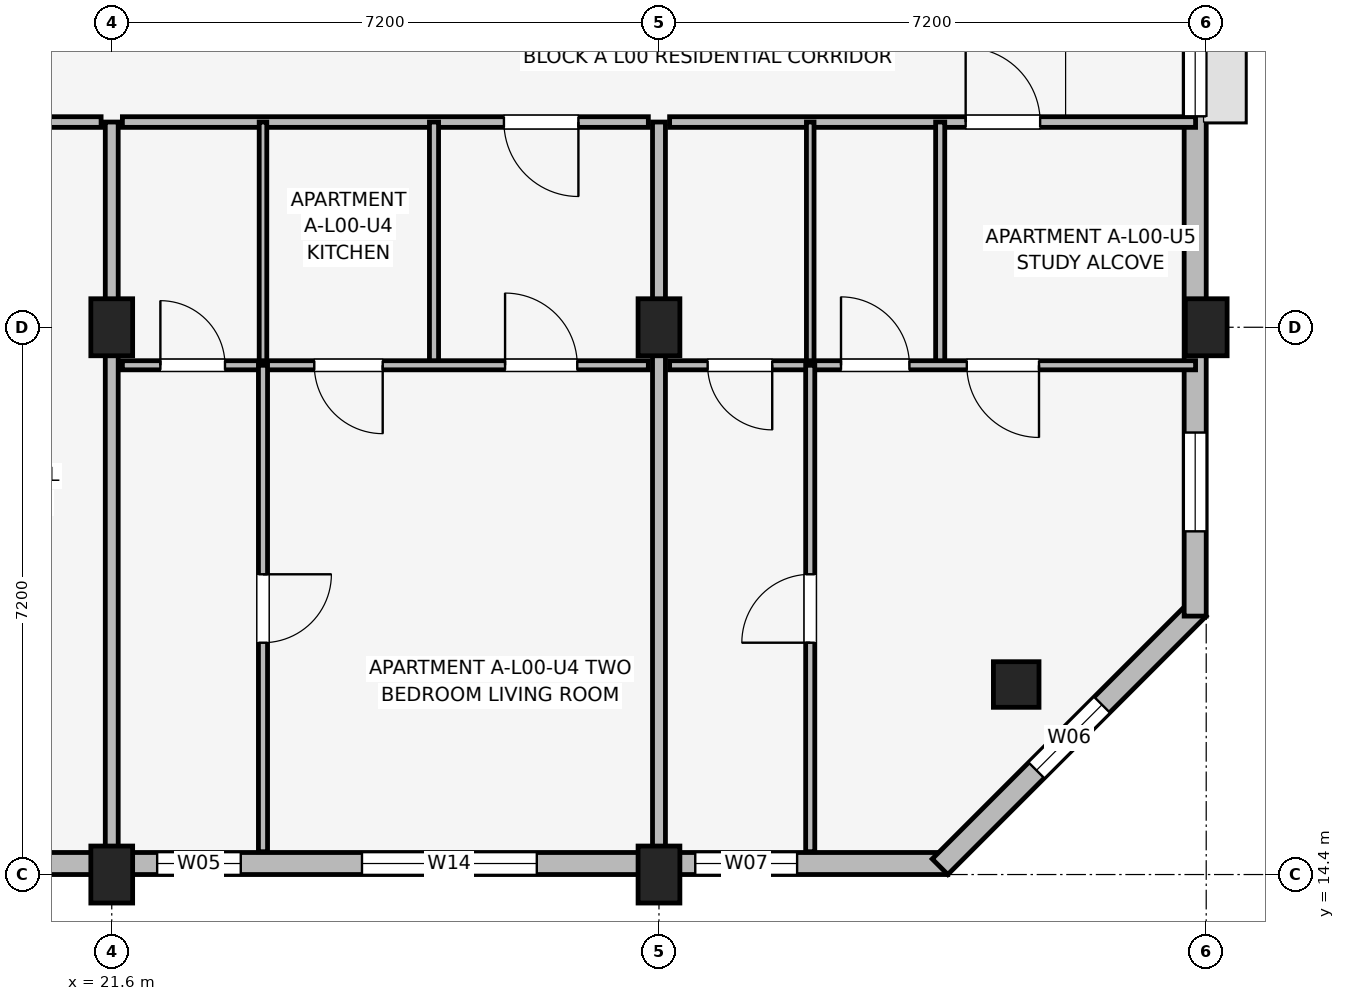
"""IFC4 building model, lengths in metres.
Left out: names, types, materials, properties, quantities, classifications, styles, units other than length and angle.
Written with IfcOpenShell. Run it as: python <this file> out.ifc"""

import sys

from ifc_helpers import new_model, si_unit, direction, frame, frame_2d, origin, origin_2d, place, context, subcontext, project, spatial, rectangle, extrude, element, fill, save


model = new_model("IFC4")
c1 = context("Model", 3, precision=1e-05, world=origin(), true_north=direction((0.0, 1.0)))
c2 = subcontext(c1, "Body", "Model", "MODEL_VIEW")
j1 = project(units=[si_unit("LENGTHUNIT", "METRE"), si_unit("PLANEANGLEUNIT", "RADIAN")], contexts=[c1])
p1 = place(None, origin())
s1 = spatial("IfcSite", under=j1, at=p1, CompositionType="ELEMENT")
p2 = place(p1, origin())
s2 = spatial("IfcBuilding", under=s1, at=p2, CompositionType="ELEMENT")
p3 = place(p2, origin())
s3 = spatial("IfcBuildingStorey", under=s2, at=p3, CompositionType="ELEMENT", Elevation=0.0)
for number, where, z_axis, x_axis in (
    (1, (21.6, 14.4, 0.0), (0.0, 0.0, 1.0), (1.0, 0.0, 0.0)),
    (2, (21.6, 21.6, 0.0), (0.0, 0.0, 1.0), (1.0, 0.0, 0.0)),
    (3, (28.8, 14.4, 0.0), (0.0, 0.0, 1.0), (1.0, 0.0, 0.0)),
    (4, (28.8, 21.6, 0.0), (0.0, 0.0, 1.0), (1.0, 0.0, 0.0)),
):
    element("IfcColumn", number, at=place(p3, frame(where, z_axis=z_axis, x_axis=x_axis)), inside=s3, PredefinedType="COLUMN", context=c2, shape_type="SweptSolid", body=[
        extrude(rectangle(XDim=0.55, YDim=0.75, at=origin_2d()), origin(), (0.0, 0.0, 1.0), 4.5),
    ])
p4 = place(p3, frame((33.5, 16.9, 0.0), z_axis=(0.0, 0.0, 1.0), x_axis=(1.0, 0.0, 0.0)))
e5 = element("IfcColumn", 5, at=p4, inside=s3, PredefinedType="COLUMN", context=c2, shape_type="SweptSolid", body=[
    extrude(rectangle(XDim=0.6, YDim=0.6, at=origin_2d()), origin(), (0.0, 0.0, 1.0), 4.5),
])
p5 = place(p3, frame((36.0, 21.6, 0.0), z_axis=(0.0, 0.0, 1.0), x_axis=(1.0, 0.0, 0.0)))
e6 = element("IfcColumn", 6, at=p5, inside=s3, PredefinedType="COLUMN", context=c2, shape_type="SweptSolid", body=[
    extrude(rectangle(XDim=0.55, YDim=0.75, at=origin_2d()), origin(), (0.0, 0.0, 1.0), 4.5),
])
p6 = place(p3, frame((3.4, 14.545, 0.0), z_axis=(0.0, 0.0, 1.0), x_axis=(1.0, 0.0, 0.0)))
e7 = element("IfcWall", 7, at=p6, inside=s3, PredefinedType="SOLIDWALL", context=c2, shape_type="SweptSolid", body=[
    extrude(rectangle(XDim=29.2, YDim=0.29, at=frame_2d((14.6, 0.0))), origin(), (0.0, 0.0, 1.0), 3.53),
])
p7 = place(p6, frame((13.95, 0.0, 0.0), z_axis=(0.0, 0.0, 1.0), x_axis=(-1.0, 0.0, 0.0)))
e8 = element("IfcOpeningElement", 8, at=p7, cuts=e7, PredefinedType="OPENING", context=c2, shape_type="SweptSolid", body=[
    extrude(rectangle(XDim=1.8, YDim=2.4, at=frame_2d((0.9, 1.2))), frame((0.0, 0.155, 0.0), z_axis=(0.0, -1.0, 0.0), x_axis=(1.0, 0.0, 0.0)), (0.0, 0.0, 1.0), 0.31),
])
p8 = place(p6, frame((1.502, 0.0, 0.75)))
e9 = element("IfcOpeningElement", 9, at=p8, cuts=e7, PredefinedType="OPENING", context=c2, shape_type="SweptSolid", body=[
    extrude(rectangle(XDim=0.85, YDim=1.4, at=frame_2d((0.425, 0.7))), frame((0.0, 0.155, 0.0), z_axis=(0.0, -1.0, 0.0), x_axis=(1.0, 0.0, 0.0)), (0.0, 0.0, 1.0), 0.31),
])
p9 = place(p6, frame((6.4, 0.0, 0.7)))
e10 = element("IfcOpeningElement", 10, at=p9, cuts=e7, PredefinedType="OPENING", context=c2, shape_type="SweptSolid", body=[
    extrude(rectangle(XDim=2.0, YDim=1.65, at=frame_2d((1.0, 0.825))), frame((0.0, 0.155, 0.0), z_axis=(0.0, -1.0, 0.0), x_axis=(1.0, 0.0, 0.0)), (0.0, 0.0, 1.0), 0.31),
])
p10 = place(p6, frame((18.798, 0.0, 0.75)))
e11 = element("IfcOpeningElement", 11, at=p10, cuts=e7, PredefinedType="OPENING", context=c2, shape_type="SweptSolid", body=[
    extrude(rectangle(XDim=1.1, YDim=1.5, at=frame_2d((0.55, 0.75))), frame((0.0, 0.155, 0.0), z_axis=(0.0, -1.0, 0.0), x_axis=(1.0, 0.0, 0.0)), (0.0, 0.0, 1.0), 0.31),
])
p11 = place(p6, frame((21.492, 0.0, 0.7)))
e12 = element("IfcOpeningElement", 12, at=p11, cuts=e7, PredefinedType="OPENING", context=c2, shape_type="SweptSolid", body=[
    extrude(rectangle(XDim=2.3, YDim=1.65, at=frame_2d((1.15, 0.825))), frame((0.0, 0.155, 0.0), z_axis=(0.0, -1.0, 0.0), x_axis=(1.0, 0.0, 0.0)), (0.0, 0.0, 1.0), 0.31),
])
p12 = place(p6, frame((25.877, 0.0, 0.75)))
e13 = element("IfcOpeningElement", 13, at=p12, cuts=e7, PredefinedType="OPENING", context=c2, shape_type="SweptSolid", body=[
    extrude(rectangle(XDim=1.34, YDim=1.55, at=frame_2d((0.67, 0.775))), frame((0.0, 0.155, 0.0), z_axis=(0.0, -1.0, 0.0), x_axis=(1.0, 0.0, 0.0)), (0.0, 0.0, 1.0), 0.31),
])
p13 = place(p3, frame((32.498, 14.502, 0.0), z_axis=(0.0, 0.0, 1.0), x_axis=(0.707081393635, 0.707132167827, 0.0)))
e14 = element("IfcWall", 14, at=p13, inside=s3, PredefinedType="SOLIDWALL", context=c2, shape_type="SweptSolid", body=[
    extrude(rectangle(XDim=4.808, YDim=0.29, at=frame_2d((2.404, 0.0))), origin(), (0.0, 0.0, 1.0), 4.175),
])
p14 = place(p13, frame((1.794, 0.0, 0.85)))
e15 = element("IfcOpeningElement", 15, at=p14, cuts=e14, PredefinedType="OPENING", context=c2, shape_type="SweptSolid", body=[
    extrude(rectangle(XDim=1.22, YDim=1.5, at=frame_2d((0.61, 0.75))), frame((0.0, 0.155, 0.0), z_axis=(0.0, -1.0, 0.0), x_axis=(1.0, 0.0, 0.0)), (0.0, 0.0, 1.0), 0.31),
])
p15 = place(p3, frame((35.855, 17.8, 0.0), z_axis=(0.0, 0.0, 1.0), x_axis=(0.0, 1.0, 0.0)))
e16 = element("IfcWall", 16, at=p15, inside=s3, PredefinedType="SOLIDWALL", context=c2, shape_type="SweptSolid", body=[
    extrude(rectangle(XDim=14.8, YDim=0.29, at=frame_2d((7.4, 0.0))), origin(), (0.0, 0.0, 1.0), 3.53),
])
p16 = place(p15, frame((6.575, 0.0, 1.05)))
e17 = element("IfcOpeningElement", 17, at=p16, cuts=e16, PredefinedType="OPENING", context=c2, shape_type="SweptSolid", body=[
    extrude(rectangle(XDim=1.65, YDim=1.15, at=frame_2d((0.825, 0.575))), frame((0.0, 0.155, 0.0), z_axis=(0.0, -1.0, 0.0), x_axis=(1.0, 0.0, 0.0)), (0.0, 0.0, 1.0), 0.31),
])
p17 = place(p15, frame((1.115, 0.0, 0.75)))
e18 = element("IfcOpeningElement", 18, at=p17, cuts=e16, PredefinedType="OPENING", context=c2, shape_type="SweptSolid", body=[
    extrude(rectangle(XDim=1.3, YDim=1.55, at=frame_2d((0.65, 0.775))), frame((0.0, 0.155, 0.0), z_axis=(0.0, -1.0, 0.0), x_axis=(1.0, 0.0, 0.0)), (0.0, 0.0, 1.0), 0.31),
])
p18 = place(p3, frame((14.54, 24.3, 0.0), z_axis=(0.0, 0.0, 1.0), x_axis=(1.0, 0.0, 0.0)))
e19 = element("IfcWall", 19, at=p18, inside=s3, PredefinedType="PARTITIONING", context=c2, shape_type="SweptSolid", body=[
    extrude(rectangle(XDim=6.92, YDim=0.14, at=frame_2d((3.46, 0.0))), origin(), (0.0, 0.0, 1.0), 3.15),
])
p19 = place(p18, frame((2.65, 0.0, 0.0), z_axis=(0.0, 0.0, 1.0), x_axis=(-1.0, 0.0, 0.0)))
e20 = element("IfcOpeningElement", 20, at=p19, cuts=e19, PredefinedType="OPENING", context=c2, shape_type="SweptSolid", body=[
    extrude(rectangle(XDim=1.4, YDim=2.22, at=frame_2d((0.7, 1.11))), frame((0.0, 0.08, 0.0), z_axis=(0.0, -1.0, 0.0), x_axis=(1.0, 0.0, 0.0)), (0.0, 0.0, 1.0), 0.16),
])
p20 = place(p18, frame((5.07, 0.0, 0.0)))
e21 = element("IfcOpeningElement", 21, at=p20, cuts=e19, PredefinedType="OPENING", context=c2, shape_type="SweptSolid", body=[
    extrude(rectangle(XDim=1.0, YDim=2.12, at=frame_2d((0.5, 1.06))), frame((0.0, 0.08, 0.0), z_axis=(0.0, -1.0, 0.0), x_axis=(1.0, 0.0, 0.0)), (0.0, 0.0, 1.0), 0.16),
])
p21 = place(p3, frame((21.6, 14.7, 0.0), z_axis=(0.0, 0.0, 1.0), x_axis=(0.0, 1.0, 0.0)))
e22 = element("IfcWall", 22, at=p21, inside=s3, PredefinedType="PARTITIONING", context=c2, shape_type="SweptSolid", body=[
    extrude(rectangle(XDim=9.6, YDim=0.17, at=frame_2d((4.8, 0.0))), origin(), (0.0, 0.0, 1.0), 3.15),
])
p22 = place(p3, frame((21.74, 24.3, 0.0), z_axis=(0.0, 0.0, 1.0), x_axis=(1.0, 0.0, 0.0)))
e23 = element("IfcWall", 23, at=p22, inside=s3, PredefinedType="PARTITIONING", context=c2, shape_type="SweptSolid", body=[
    extrude(rectangle(XDim=6.92, YDim=0.14, at=frame_2d((3.46, 0.0))), origin(), (0.0, 0.0, 1.0), 3.15),
])
p23 = place(p22, frame((6.0, 0.0, 0.0), z_axis=(0.0, 0.0, 1.0), x_axis=(-1.0, 0.0, 0.0)))
e24 = element("IfcOpeningElement", 24, at=p23, cuts=e23, PredefinedType="OPENING", context=c2, shape_type="SweptSolid", body=[
    extrude(rectangle(XDim=0.98, YDim=2.1, at=frame_2d((0.49, 1.05))), frame((0.0, 0.08, 0.0), z_axis=(0.0, -1.0, 0.0), x_axis=(1.0, 0.0, 0.0)), (0.0, 0.0, 1.0), 0.16),
])
p24 = place(p3, frame((23.59, 21.1, 0.0), z_axis=(0.0, 0.0, 1.0), x_axis=(0.0, 1.0, 0.0)))
e25 = element("IfcWall", 25, at=p24, inside=s3, PredefinedType="PARTITIONING", context=c2, shape_type="SweptSolid", body=[
    extrude(rectangle(XDim=3.2, YDim=0.1, at=frame_2d((1.6, 0.0))), origin(), (0.0, 0.0, 1.0), 3.15),
])
p25 = place(p3, frame((25.84, 21.1, 0.0), z_axis=(0.0, 0.0, 1.0), x_axis=(0.0, 1.0, 0.0)))
e26 = element("IfcWall", 26, at=p25, inside=s3, PredefinedType="PARTITIONING", context=c2, shape_type="SweptSolid", body=[
    extrude(rectangle(XDim=3.2, YDim=0.12, at=frame_2d((1.6, 0.0))), origin(), (0.0, 0.0, 1.0), 3.15),
])
p26 = place(p3, frame((21.74, 21.1, 0.0), z_axis=(0.0, 0.0, 1.0), x_axis=(1.0, 0.0, 0.0)))
e27 = element("IfcWall", 27, at=p26, inside=s3, PredefinedType="PARTITIONING", context=c2, shape_type="SweptSolid", body=[
    extrude(rectangle(XDim=6.92, YDim=0.12, at=frame_2d((3.46, 0.0))), origin(), (0.0, 0.0, 1.0), 3.15),
])
p27 = place(p26, frame((0.5, 0.0, 0.0)))
e28 = element("IfcOpeningElement", 28, at=p27, cuts=e27, PredefinedType="OPENING", context=c2, shape_type="SweptSolid", body=[
    extrude(rectangle(XDim=0.85, YDim=2.08, at=frame_2d((0.425, 1.04))), frame((0.0, 0.07, 0.0), z_axis=(0.0, -1.0, 0.0), x_axis=(1.0, 0.0, 0.0)), (0.0, 0.0, 1.0), 0.14),
])
p28 = place(p26, frame((3.425, 0.0, 0.0), z_axis=(0.0, 0.0, 1.0), x_axis=(-1.0, 0.0, 0.0)))
e29 = element("IfcOpeningElement", 29, at=p28, cuts=e27, PredefinedType="OPENING", context=c2, shape_type="SweptSolid", body=[
    extrude(rectangle(XDim=0.9, YDim=2.08, at=frame_2d((0.45, 1.04))), frame((0.0, 0.07, 0.0), z_axis=(0.0, -1.0, 0.0), x_axis=(1.0, 0.0, 0.0)), (0.0, 0.0, 1.0), 0.14),
])
p29 = place(p26, frame((5.035, 0.0, 0.0)))
e30 = element("IfcOpeningElement", 30, at=p29, cuts=e27, PredefinedType="OPENING", context=c2, shape_type="SweptSolid", body=[
    extrude(rectangle(XDim=0.95, YDim=2.08, at=frame_2d((0.475, 1.04))), frame((0.0, 0.07, 0.0), z_axis=(0.0, -1.0, 0.0), x_axis=(1.0, 0.0, 0.0)), (0.0, 0.0, 1.0), 0.14),
])
p30 = place(p3, frame((23.59, 14.7, 0.0), z_axis=(0.0, 0.0, 1.0), x_axis=(0.0, 1.0, 0.0)))
e31 = element("IfcWall", 31, at=p30, inside=s3, PredefinedType="PARTITIONING", context=c2, shape_type="SweptSolid", body=[
    extrude(rectangle(XDim=6.4, YDim=0.12, at=frame_2d((3.2, 0.0))), origin(), (0.0, 0.0, 1.0), 3.15),
])
p31 = place(p30, frame((3.65, 0.0, 0.0), z_axis=(0.0, 0.0, 1.0), x_axis=(-1.0, 0.0, 0.0)))
e32 = element("IfcOpeningElement", 32, at=p31, cuts=e31, PredefinedType="OPENING", context=c2, shape_type="SweptSolid", body=[
    extrude(rectangle(XDim=0.9, YDim=2.08, at=frame_2d((0.45, 1.04))), frame((0.0, 0.07, 0.0), z_axis=(0.0, -1.0, 0.0), x_axis=(1.0, 0.0, 0.0)), (0.0, 0.0, 1.0), 0.14),
])
p32 = place(p3, frame((28.8, 14.7, 0.0), z_axis=(0.0, 0.0, 1.0), x_axis=(0.0, 1.0, 0.0)))
e33 = element("IfcWall", 33, at=p32, inside=s3, PredefinedType="PARTITIONING", context=c2, shape_type="SweptSolid", body=[
    extrude(rectangle(XDim=9.6, YDim=0.17, at=frame_2d((4.8, 0.0))), origin(), (0.0, 0.0, 1.0), 3.15),
])
p33 = place(p3, frame((28.94, 24.3, 0.0), z_axis=(0.0, 0.0, 1.0), x_axis=(1.0, 0.0, 0.0)))
e34 = element("IfcWall", 34, at=p33, inside=s3, PredefinedType="PARTITIONING", context=c2, shape_type="SweptSolid", body=[
    extrude(rectangle(XDim=6.92, YDim=0.14, at=frame_2d((3.46, 0.0))), origin(), (0.0, 0.0, 1.0), 3.15),
])
p34 = place(p33, frame((3.895, 0.0, 0.0)))
e35 = element("IfcOpeningElement", 35, at=p34, cuts=e34, PredefinedType="OPENING", context=c2, shape_type="SweptSolid", body=[
    extrude(rectangle(XDim=0.98, YDim=2.1, at=frame_2d((0.49, 1.05))), frame((0.0, 0.08, 0.0), z_axis=(0.0, -1.0, 0.0), x_axis=(1.0, 0.0, 0.0)), (0.0, 0.0, 1.0), 0.16),
])
p35 = place(p3, frame((30.79, 21.1, 0.0), z_axis=(0.0, 0.0, 1.0), x_axis=(0.0, 1.0, 0.0)))
e36 = element("IfcWall", 36, at=p35, inside=s3, PredefinedType="PARTITIONING", context=c2, shape_type="SweptSolid", body=[
    extrude(rectangle(XDim=3.2, YDim=0.1, at=frame_2d((1.6, 0.0))), origin(), (0.0, 0.0, 1.0), 3.15),
])
p36 = place(p3, frame((32.5, 21.1, 0.0), z_axis=(0.0, 0.0, 1.0), x_axis=(0.0, 1.0, 0.0)))
e37 = element("IfcWall", 37, at=p36, inside=s3, PredefinedType="PARTITIONING", context=c2, shape_type="SweptSolid", body=[
    extrude(rectangle(XDim=3.2, YDim=0.12, at=frame_2d((1.6, 0.0))), origin(), (0.0, 0.0, 1.0), 3.15),
])
p37 = place(p3, frame((28.94, 21.1, 0.0), z_axis=(0.0, 0.0, 1.0), x_axis=(1.0, 0.0, 0.0)))
e38 = element("IfcWall", 38, at=p37, inside=s3, PredefinedType="PARTITIONING", context=c2, shape_type="SweptSolid", body=[
    extrude(rectangle(XDim=6.92, YDim=0.12, at=frame_2d((3.46, 0.0))), origin(), (0.0, 0.0, 1.0), 3.15),
])
p38 = place(p37, frame((1.35, 0.0, 0.0), z_axis=(0.0, 0.0, 1.0), x_axis=(-1.0, 0.0, 0.0)))
e39 = element("IfcOpeningElement", 39, at=p38, cuts=e38, PredefinedType="OPENING", context=c2, shape_type="SweptSolid", body=[
    extrude(rectangle(XDim=0.85, YDim=2.08, at=frame_2d((0.425, 1.04))), frame((0.0, 0.07, 0.0), z_axis=(0.0, -1.0, 0.0), x_axis=(1.0, 0.0, 0.0)), (0.0, 0.0, 1.0), 0.14),
])
p39 = place(p37, frame((2.255, 0.0, 0.0)))
e40 = element("IfcOpeningElement", 40, at=p39, cuts=e38, PredefinedType="OPENING", context=c2, shape_type="SweptSolid", body=[
    extrude(rectangle(XDim=0.9, YDim=2.08, at=frame_2d((0.45, 1.04))), frame((0.0, 0.07, 0.0), z_axis=(0.0, -1.0, 0.0), x_axis=(1.0, 0.0, 0.0)), (0.0, 0.0, 1.0), 0.14),
])
p40 = place(p37, frame((4.86, 0.0, 0.0), z_axis=(0.0, 0.0, 1.0), x_axis=(-1.0, 0.0, 0.0)))
e41 = element("IfcOpeningElement", 41, at=p40, cuts=e38, PredefinedType="OPENING", context=c2, shape_type="SweptSolid", body=[
    extrude(rectangle(XDim=0.95, YDim=2.08, at=frame_2d((0.475, 1.04))), frame((0.0, 0.07, 0.0), z_axis=(0.0, -1.0, 0.0), x_axis=(1.0, 0.0, 0.0)), (0.0, 0.0, 1.0), 0.14),
])
p41 = place(p3, frame((30.79, 14.7, 0.0), z_axis=(0.0, 0.0, 1.0), x_axis=(0.0, 1.0, 0.0)))
e42 = element("IfcWall", 42, at=p41, inside=s3, PredefinedType="PARTITIONING", context=c2, shape_type="SweptSolid", body=[
    extrude(rectangle(XDim=6.4, YDim=0.12, at=frame_2d((3.2, 0.0))), origin(), (0.0, 0.0, 1.0), 3.15),
])
p42 = place(p41, frame((2.75, 0.0, 0.0)))
e43 = element("IfcOpeningElement", 43, at=p42, cuts=e42, PredefinedType="OPENING", context=c2, shape_type="SweptSolid", body=[
    extrude(rectangle(XDim=0.9, YDim=2.08, at=frame_2d((0.45, 1.04))), frame((0.0, 0.07, 0.0), z_axis=(0.0, -1.0, 0.0), x_axis=(1.0, 0.0, 0.0)), (0.0, 0.0, 1.0), 0.14),
])
p43 = place(p14, origin())
e44 = element("IfcWindow", 44, at=p43, inside=s3, PartitioningType="SINGLE_PANEL", PredefinedType="WINDOW", context=c2, shape_type="SweptSolid", body=[
    extrude(rectangle(XDim=1.22, YDim=1.5, at=frame_2d((0.61, 0.75))), frame((0.0, 0.03, 0.0), z_axis=(0.0, -1.0, 0.0), x_axis=(1.0, 0.0, 0.0)), (0.0, 0.0, 1.0), 0.06),
])
fill(e15, e44)
p44 = place(p10, origin())
e45 = element("IfcWindow", 45, at=p44, inside=s3, PartitioningType="SINGLE_PANEL", PredefinedType="WINDOW", context=c2, shape_type="SweptSolid", body=[
    extrude(rectangle(XDim=1.1, YDim=1.5, at=frame_2d((0.55, 0.75))), frame((0.0, 0.03, 0.0), z_axis=(0.0, -1.0, 0.0), x_axis=(1.0, 0.0, 0.0)), (0.0, 0.0, 1.0), 0.06),
])
fill(e11, e45)
p45 = place(p11, origin())
e46 = element("IfcWindow", 46, at=p45, inside=s3, PartitioningType="SINGLE_PANEL", PredefinedType="WINDOW", context=c2, shape_type="SweptSolid", body=[
    extrude(rectangle(XDim=2.3, YDim=1.65, at=frame_2d((1.15, 0.825))), frame((0.0, 0.03, 0.0), z_axis=(0.0, -1.0, 0.0), x_axis=(1.0, 0.0, 0.0)), (0.0, 0.0, 1.0), 0.06),
])
fill(e12, e46)
p46 = place(p12, origin())
e47 = element("IfcWindow", 47, at=p46, inside=s3, PartitioningType="SINGLE_PANEL", PredefinedType="WINDOW", context=c2, shape_type="SweptSolid", body=[
    extrude(rectangle(XDim=1.34, YDim=1.55, at=frame_2d((0.67, 0.775))), frame((0.0, 0.03, 0.0), z_axis=(0.0, -1.0, 0.0), x_axis=(1.0, 0.0, 0.0)), (0.0, 0.0, 1.0), 0.06),
])
fill(e13, e47)
p47 = place(p16, origin())
e48 = element("IfcWindow", 48, at=p47, inside=s3, PartitioningType="SINGLE_PANEL", PredefinedType="WINDOW", context=c2, shape_type="SweptSolid", body=[
    extrude(rectangle(XDim=1.65, YDim=1.15, at=frame_2d((0.825, 0.575))), frame((0.0, 0.03, 0.0), z_axis=(0.0, -1.0, 0.0), x_axis=(1.0, 0.0, 0.0)), (0.0, 0.0, 1.0), 0.06),
])
fill(e17, e48)
p48 = place(p17, origin())
e49 = element("IfcWindow", 49, at=p48, inside=s3, PartitioningType="SINGLE_PANEL", PredefinedType="WINDOW", context=c2, shape_type="SweptSolid", body=[
    extrude(rectangle(XDim=1.3, YDim=1.55, at=frame_2d((0.65, 0.775))), frame((0.0, 0.03, 0.0), z_axis=(0.0, -1.0, 0.0), x_axis=(1.0, 0.0, 0.0)), (0.0, 0.0, 1.0), 0.06),
])
fill(e18, e49)
p49 = place(p23, origin())
e50 = element("IfcDoor", 50, at=p49, inside=s3, OperationType="SINGLE_SWING_RIGHT", PredefinedType="DOOR", context=c2, shape_type="SweptSolid", body=[
    extrude(rectangle(XDim=0.98, YDim=2.1, at=frame_2d((0.49, 1.05))), frame((0.0, 0.025, 0.0), z_axis=(0.0, -1.0, 0.0), x_axis=(1.0, 0.0, 0.0)), (0.0, 0.0, 1.0), 0.05),
])
fill(e24, e50)
p50 = place(p27, origin())
e51 = element("IfcDoor", 51, at=p50, inside=s3, OperationType="SINGLE_SWING_LEFT", PredefinedType="DOOR", context=c2, shape_type="SweptSolid", body=[
    extrude(rectangle(XDim=0.85, YDim=2.08, at=frame_2d((0.425, 1.04))), frame((0.0, 0.025, 0.0), z_axis=(0.0, -1.0, 0.0), x_axis=(1.0, 0.0, 0.0)), (0.0, 0.0, 1.0), 0.05),
])
fill(e28, e51)
p51 = place(p28, origin())
e52 = element("IfcDoor", 52, at=p51, inside=s3, OperationType="SINGLE_SWING_RIGHT", PredefinedType="DOOR", context=c2, shape_type="SweptSolid", body=[
    extrude(rectangle(XDim=0.9, YDim=2.08, at=frame_2d((0.45, 1.04))), frame((0.0, 0.025, 0.0), z_axis=(0.0, -1.0, 0.0), x_axis=(1.0, 0.0, 0.0)), (0.0, 0.0, 1.0), 0.05),
])
fill(e29, e52)
p52 = place(p29, origin())
e53 = element("IfcDoor", 53, at=p52, inside=s3, OperationType="SINGLE_SWING_LEFT", PredefinedType="DOOR", context=c2, shape_type="SweptSolid", body=[
    extrude(rectangle(XDim=0.95, YDim=2.08, at=frame_2d((0.475, 1.04))), frame((0.0, 0.025, 0.0), z_axis=(0.0, -1.0, 0.0), x_axis=(1.0, 0.0, 0.0)), (0.0, 0.0, 1.0), 0.05),
])
fill(e30, e53)
p53 = place(p31, origin())
e54 = element("IfcDoor", 54, at=p53, inside=s3, OperationType="SINGLE_SWING_RIGHT", PredefinedType="DOOR", context=c2, shape_type="SweptSolid", body=[
    extrude(rectangle(XDim=0.9, YDim=2.08, at=frame_2d((0.45, 1.04))), frame((0.0, 0.025, 0.0), z_axis=(0.0, -1.0, 0.0), x_axis=(1.0, 0.0, 0.0)), (0.0, 0.0, 1.0), 0.05),
])
fill(e32, e54)
p54 = place(p34, origin())
e55 = element("IfcDoor", 55, at=p54, inside=s3, OperationType="SINGLE_SWING_LEFT", PredefinedType="DOOR", context=c2, shape_type="SweptSolid", body=[
    extrude(rectangle(XDim=0.98, YDim=2.1, at=frame_2d((0.49, 1.05))), frame((0.0, 0.025, 0.0), z_axis=(0.0, -1.0, 0.0), x_axis=(1.0, 0.0, 0.0)), (0.0, 0.0, 1.0), 0.05),
])
fill(e35, e55)
p55 = place(p38, origin())
e56 = element("IfcDoor", 56, at=p55, inside=s3, OperationType="SINGLE_SWING_RIGHT", PredefinedType="DOOR", context=c2, shape_type="SweptSolid", body=[
    extrude(rectangle(XDim=0.85, YDim=2.08, at=frame_2d((0.425, 1.04))), frame((0.0, 0.025, 0.0), z_axis=(0.0, -1.0, 0.0), x_axis=(1.0, 0.0, 0.0)), (0.0, 0.0, 1.0), 0.05),
])
fill(e39, e56)
p56 = place(p39, origin())
e57 = element("IfcDoor", 57, at=p56, inside=s3, OperationType="SINGLE_SWING_LEFT", PredefinedType="DOOR", context=c2, shape_type="SweptSolid", body=[
    extrude(rectangle(XDim=0.9, YDim=2.08, at=frame_2d((0.45, 1.04))), frame((0.0, 0.025, 0.0), z_axis=(0.0, -1.0, 0.0), x_axis=(1.0, 0.0, 0.0)), (0.0, 0.0, 1.0), 0.05),
])
fill(e40, e57)
p57 = place(p40, origin())
e58 = element("IfcDoor", 58, at=p57, inside=s3, OperationType="SINGLE_SWING_RIGHT", PredefinedType="DOOR", context=c2, shape_type="SweptSolid", body=[
    extrude(rectangle(XDim=0.95, YDim=2.08, at=frame_2d((0.475, 1.04))), frame((0.0, 0.025, 0.0), z_axis=(0.0, -1.0, 0.0), x_axis=(1.0, 0.0, 0.0)), (0.0, 0.0, 1.0), 0.05),
])
fill(e41, e58)
p58 = place(p42, origin())
e59 = element("IfcDoor", 59, at=p58, inside=s3, OperationType="SINGLE_SWING_LEFT", PredefinedType="DOOR", context=c2, shape_type="SweptSolid", body=[
    extrude(rectangle(XDim=0.9, YDim=2.08, at=frame_2d((0.45, 1.04))), frame((0.0, 0.025, 0.0), z_axis=(0.0, -1.0, 0.0), x_axis=(1.0, 0.0, 0.0)), (0.0, 0.0, 1.0), 0.05),
])
fill(e43, e59)
save(model, sys.argv[1])
